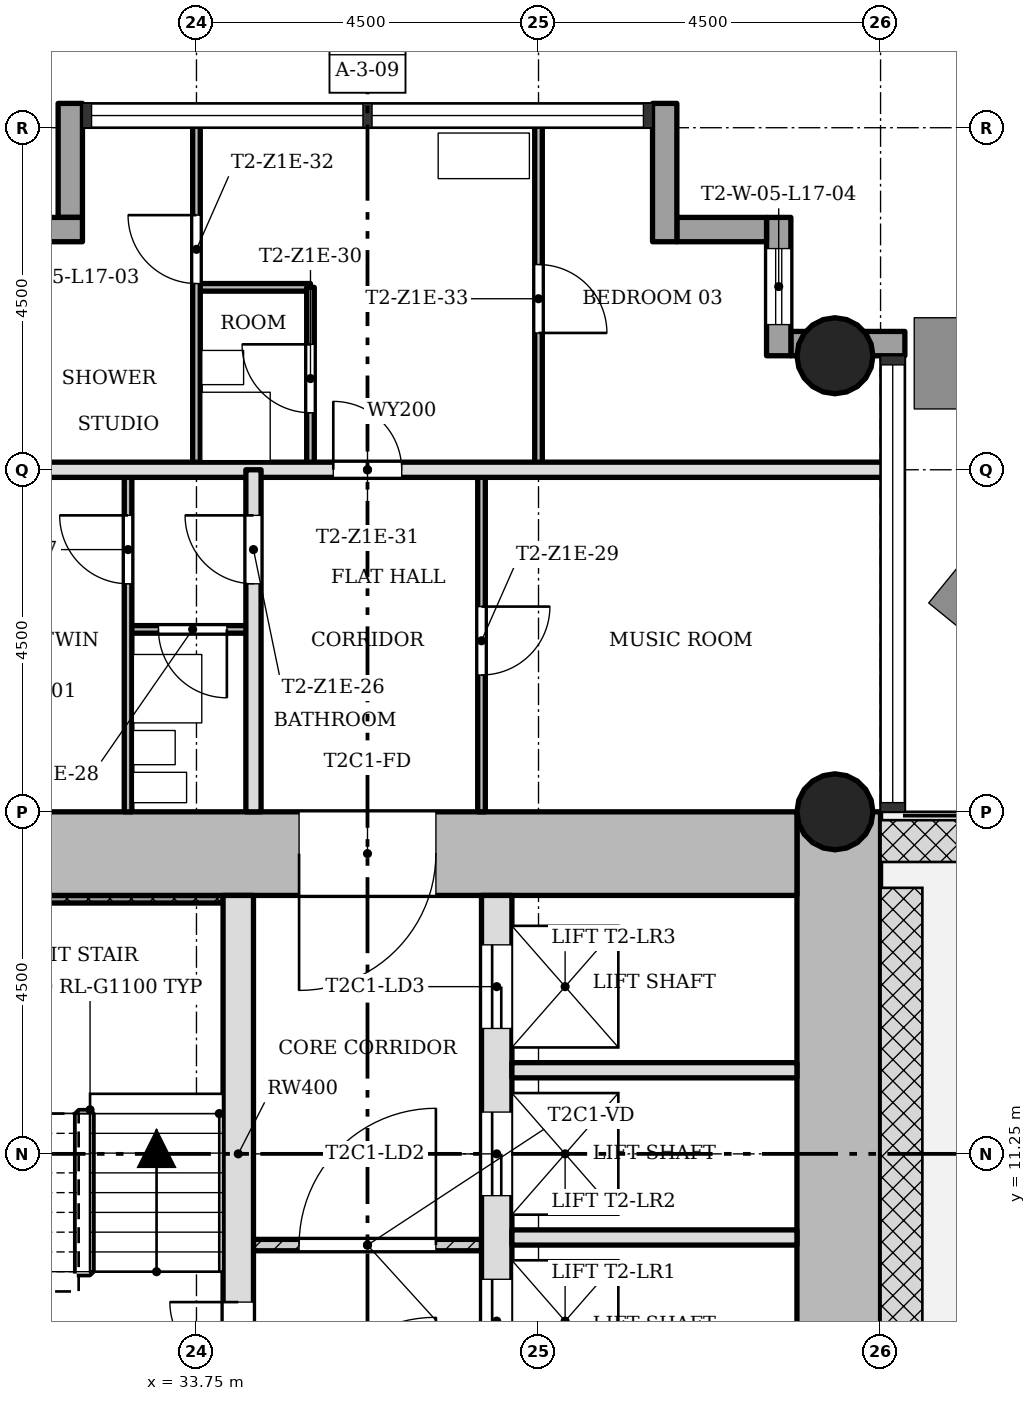
"""IFC4 building model, lengths in metres.
Left out: names, types, materials, properties, quantities, classifications, styles, units other than length and angle.
Written with IfcOpenShell. Run it as: python <this file> out.ifc"""

import sys

from ifc_helpers import new_model, si_unit, direction, frame, frame_2d, origin, origin_2d, place, context, subcontext, project, spatial, rectangle, hollow_circle, extrude, element, fill, save


model = new_model("IFC4")
c1 = context("Model", 3, precision=1e-05, world=origin(), true_north=direction((0.0, 1.0)))
c2 = subcontext(c1, "Body", "Model", "MODEL_VIEW")
j1 = project(units=[si_unit("LENGTHUNIT", "METRE"), si_unit("PLANEANGLEUNIT", "RADIAN")], contexts=[c1])
p1 = place(None, origin())
s1 = spatial("IfcSite", under=j1, at=p1, CompositionType="ELEMENT")
p2 = place(p1, origin())
s2 = spatial("IfcBuilding", under=s1, at=p2, CompositionType="ELEMENT")
p3 = place(p2, frame((0.0, 0.0, 65.3)))
s3 = spatial("IfcBuildingStorey", under=s2, at=p3, CompositionType="ELEMENT", Elevation=65.3)
p4 = place(p3, frame((42.2, 7.85, 0.0), z_axis=(0.0, 0.0, 1.0), x_axis=(0.0, 1.0, 0.0)))
e1 = element("IfcWall", 1, at=p4, inside=s3, PredefinedType="SHEAR", context=c2, shape_type="SweptSolid", body=[
    extrude(rectangle(XDim=7.9, YDim=1.1, at=frame_2d((3.95, 0.0))), origin(), (0.0, 0.0, 1.0), 3.4),
])
p5 = place(p3, frame((41.65, 15.2, 0.0), z_axis=(0.0, 0.0, 1.0), x_axis=(-1.0, 0.0, 0.0)))
e2 = element("IfcWall", 2, at=p5, inside=s3, PredefinedType="SHEAR", context=c2, shape_type="SweptSolid", body=[
    extrude(rectangle(XDim=12.4, YDim=1.1, at=frame_2d((6.2, 0.0))), origin(), (0.0, 0.0, 1.0), 3.4),
])
p6 = place(p5, frame((4.75, 0.0, 0.0)))
e3 = element("IfcOpeningElement", 3, at=p6, cuts=e2, PredefinedType="OPENING", context=c2, shape_type="SweptSolid", body=[
    extrude(rectangle(XDim=1.8, YDim=2.1, at=frame_2d((0.9, 1.05))), frame((0.0, 0.56, 0.0), z_axis=(0.0, -1.0, 0.0), x_axis=(1.0, 0.0, 0.0)), (0.0, 0.0, 1.0), 1.12),
])
p7 = place(p3, frame((34.3, 7.85, 0.0), z_axis=(0.0, 0.0, 1.0), x_axis=(0.0, 1.0, 0.0)))
e4 = element("IfcWall", 4, at=p7, inside=s3, PredefinedType="SHEAR", context=c2, shape_type="SweptSolid", body=[
    extrude(rectangle(XDim=6.8, YDim=0.4, at=frame_2d((3.4, 0.0))), origin(), (0.0, 0.0, 1.0), 3.4),
])
p8 = place(p7, frame((0.55, 0.0, 0.0)))
e5 = element("IfcOpeningElement", 5, at=p8, cuts=e4, PredefinedType="OPENING", context=c2, shape_type="SweptSolid", body=[
    extrude(rectangle(XDim=0.9, YDim=2.1, at=frame_2d((0.45, 1.05))), frame((0.0, 0.21, 0.0), z_axis=(0.0, -1.0, 0.0), x_axis=(1.0, 0.0, 0.0)), (0.0, 0.0, 1.0), 0.42),
])
p9 = place(p3, frame((37.7, 7.85, 0.0), z_axis=(0.0, 0.0, 1.0), x_axis=(0.0, 1.0, 0.0)))
e6 = element("IfcWall", 6, at=p9, inside=s3, PredefinedType="SHEAR", context=c2, shape_type="SweptSolid", body=[
    extrude(rectangle(XDim=6.8, YDim=0.4, at=frame_2d((3.4, 0.0))), origin(), (0.0, 0.0, 1.0), 3.4),
])
p10 = place(p9, frame((0.65, 0.0, 0.0)))
e7 = element("IfcOpeningElement", 7, at=p10, cuts=e6, PredefinedType="OPENING", context=c2, shape_type="SweptSolid", body=[
    extrude(rectangle(XDim=1.1, YDim=2.1, at=frame_2d((0.55, 1.05))), frame((0.0, 0.21, 0.0), z_axis=(0.0, -1.0, 0.0), x_axis=(1.0, 0.0, 0.0)), (0.0, 0.0, 1.0), 0.42),
])
p11 = place(p9, frame((2.85, 0.0, 0.0)))
e8 = element("IfcOpeningElement", 8, at=p11, cuts=e6, PredefinedType="OPENING", context=c2, shape_type="SweptSolid", body=[
    extrude(rectangle(XDim=1.1, YDim=2.1, at=frame_2d((0.55, 1.05))), frame((0.0, 0.21, 0.0), z_axis=(0.0, -1.0, 0.0), x_axis=(1.0, 0.0, 0.0)), (0.0, 0.0, 1.0), 0.42),
])
p12 = place(p9, frame((5.05, 0.0, 0.0)))
e9 = element("IfcOpeningElement", 9, at=p12, cuts=e6, PredefinedType="OPENING", context=c2, shape_type="SweptSolid", body=[
    extrude(rectangle(XDim=1.1, YDim=2.1, at=frame_2d((0.55, 1.05))), frame((0.0, 0.21, 0.0), z_axis=(0.0, -1.0, 0.0), x_axis=(1.0, 0.0, 0.0)), (0.0, 0.0, 1.0), 0.42),
])
for number, where, z_axis, x_axis in (
    (10, (42.15, 15.75, 0.0), (0.0, 0.0, 1.0), (1.0, 0.0, 0.0)),
    (11, (42.15, 21.75, 0.0), (0.0, 0.0, 1.0), (1.0, 0.0, 0.0)),
):
    element("IfcColumn", number, at=place(p3, frame(where, z_axis=z_axis, x_axis=x_axis)), inside=s3, PredefinedType="COLUMN", context=c2, shape_type="SweptSolid", body=[
        extrude(hollow_circle(Radius=0.5, WallThickness=0.036, at=origin_2d()), origin(), (0.0, 0.0, 1.0), 3.4),
    ])
p13 = place(p3, frame((43.07, 21.91, -0.3), z_axis=(0.0, 0.0, 1.0), x_axis=(-1.0, 0.0, 0.0)))
e12 = element("IfcWall", 12, at=p13, inside=s3, PredefinedType="STANDARD", context=c2, shape_type="SweptSolid", body=[
    extrude(rectangle(XDim=1.5, YDim=0.32, at=frame_2d((0.75, 0.0))), origin(), (0.0, 0.0, 1.0), 3.4),
])
p14 = place(p3, frame((41.41, 21.75, -0.3), z_axis=(0.0, 0.0, 1.0), x_axis=(0.0, 1.0, 0.0)))
e13 = element("IfcWall", 13, at=p14, inside=s3, PredefinedType="STANDARD", context=c2, shape_type="SweptSolid", body=[
    extrude(rectangle(XDim=1.82, YDim=0.32, at=frame_2d((0.91, 0.0))), origin(), (0.0, 0.0, 1.0), 3.4),
])
p15 = place(p14, frame((0.41, 0.0, 1.2)))
e14 = element("IfcOpeningElement", 14, at=p15, cuts=e13, PredefinedType="OPENING", context=c2, shape_type="SweptSolid", body=[
    extrude(rectangle(XDim=1.0, YDim=1.5, at=frame_2d((0.5, 0.75))), frame((0.0, 0.17, 0.0), z_axis=(0.0, -1.0, 0.0), x_axis=(1.0, 0.0, 0.0)), (0.0, 0.0, 1.0), 0.34),
])
p16 = place(p3, frame((41.25, 23.41, -0.3), z_axis=(0.0, 0.0, 1.0), x_axis=(-1.0, 0.0, 0.0)))
e15 = element("IfcWall", 15, at=p16, inside=s3, PredefinedType="STANDARD", context=c2, shape_type="SweptSolid", body=[
    extrude(rectangle(XDim=1.18, YDim=0.32, at=frame_2d((0.59, 0.0))), origin(), (0.0, 0.0, 1.0), 3.4),
])
p17 = place(p3, frame((39.91, 23.25, -0.3), z_axis=(0.0, 0.0, 1.0), x_axis=(0.0, 1.0, 0.0)))
e16 = element("IfcWall", 16, at=p17, inside=s3, PredefinedType="STANDARD", context=c2, shape_type="SweptSolid", body=[
    extrude(rectangle(XDim=1.82, YDim=0.32, at=frame_2d((0.91, 0.0))), origin(), (0.0, 0.0, 1.0), 3.4),
])
p18 = place(p3, frame((32.09, 25.07, -0.3), z_axis=(0.0, 0.0, 1.0), x_axis=(0.0, -1.0, 0.0)))
e17 = element("IfcWall", 17, at=p18, inside=s3, PredefinedType="STANDARD", context=c2, shape_type="SweptSolid", body=[
    extrude(rectangle(XDim=1.5, YDim=0.32, at=frame_2d((0.75, 0.0))), origin(), (0.0, 0.0, 1.0), 3.4),
])
p19 = place(p3, frame((32.25, 23.41, -0.3), z_axis=(0.0, 0.0, 1.0), x_axis=(-1.0, 0.0, 0.0)))
e18 = element("IfcWall", 18, at=p19, inside=s3, PredefinedType="STANDARD", context=c2, shape_type="SweptSolid", body=[
    extrude(rectangle(XDim=1.82, YDim=0.32, at=frame_2d((0.91, 0.0))), origin(), (0.0, 0.0, 1.0), 3.4),
])
p20 = place(p19, frame((0.41, 0.0, 1.2)))
e19 = element("IfcOpeningElement", 19, at=p20, cuts=e18, PredefinedType="OPENING", context=c2, shape_type="SweptSolid", body=[
    extrude(rectangle(XDim=1.0, YDim=1.5, at=frame_2d((0.5, 0.75))), frame((0.0, 0.17, 0.0), z_axis=(0.0, -1.0, 0.0), x_axis=(1.0, 0.0, 0.0)), (0.0, 0.0, 1.0), 0.34),
])
p21 = place(p3, frame((37.5, 10.05, 0.0), z_axis=(0.0, 0.0, 1.0), x_axis=(-1.0, 0.0, 0.0)))
e20 = element("IfcWall", 20, at=p21, inside=s3, PredefinedType="PARTITIONING", context=c2, shape_type="SweptSolid", body=[
    extrude(rectangle(XDim=3.0, YDim=0.15, at=frame_2d((1.5, 0.0))), origin(), (0.0, 0.0, 1.0), 3.0),
])
p22 = place(p21, frame((0.6, 0.0, 0.0)))
e21 = element("IfcOpeningElement", 21, at=p22, cuts=e20, PredefinedType="OPENING", context=c2, shape_type="SweptSolid", body=[
    extrude(rectangle(XDim=1.8, YDim=2.1, at=frame_2d((0.9, 1.05))), frame((0.0, 0.085, 0.0), z_axis=(0.0, -1.0, 0.0), x_axis=(1.0, 0.0, 0.0)), (0.0, 0.0, 1.0), 0.17),
])
for number, where, z_axis, x_axis in (
    (22, (41.65, 10.15, 0.0), (0.0, 0.0, 1.0), (-1.0, 0.0, 0.0)),
    (23, (41.65, 12.35, 0.0), (0.0, 0.0, 1.0), (-1.0, 0.0, 0.0)),
):
    element("IfcWall", number, at=place(p3, frame(where, z_axis=z_axis, x_axis=x_axis)), inside=s3, PredefinedType="SOLIDWALL", context=c2, shape_type="SweptSolid", body=[
        extrude(rectangle(XDim=3.75, YDim=0.2, at=frame_2d((1.875, 0.0))), origin(), (0.0, 0.0, 1.0), 3.0),
    ])
p23 = place(p3, frame((34.5, 18.15, 0.0), z_axis=(0.0, 0.0, 1.0), x_axis=(-1.0, 0.0, 0.0)))
e24 = element("IfcWall", 24, at=p23, inside=s3, PredefinedType="PARTITIONING", context=c2, shape_type="SweptSolid", body=[
    extrude(rectangle(XDim=1.65, YDim=0.1, at=frame_2d((0.825, 0.0))), origin(), (0.0, 0.0, 1.0), 3.0),
])
p24 = place(p23, frame((0.35, 0.0, 0.0)))
e25 = element("IfcOpeningElement", 25, at=p24, cuts=e24, PredefinedType="OPENING", context=c2, shape_type="SweptSolid", body=[
    extrude(rectangle(XDim=0.9, YDim=2.1, at=frame_2d((0.45, 1.05))), frame((0.0, 0.06, 0.0), z_axis=(0.0, -1.0, 0.0), x_axis=(1.0, 0.0, 0.0)), (0.0, 0.0, 1.0), 0.12),
])
p25 = place(p3, frame((42.85, 20.25, 0.0), z_axis=(0.0, 0.0, 1.0), x_axis=(-1.0, 0.0, 0.0)))
e26 = element("IfcWall", 26, at=p25, inside=s3, PredefinedType="SOLIDWALL", context=c2, shape_type="SweptSolid", body=[
    extrude(rectangle(XDim=13.7, YDim=0.2, at=frame_2d((6.85, 0.0))), origin(), (0.0, 0.0, 1.0), 3.0),
])
p26 = place(p25, frame((6.4, 0.0, 0.0)))
e27 = element("IfcOpeningElement", 27, at=p26, cuts=e26, PredefinedType="OPENING", context=c2, shape_type="SweptSolid", body=[
    extrude(rectangle(XDim=0.9, YDim=2.1, at=frame_2d((0.45, 1.05))), frame((0.0, 0.11, 0.0), z_axis=(0.0, -1.0, 0.0), x_axis=(1.0, 0.0, 0.0)), (0.0, 0.0, 1.0), 0.22),
])
p27 = place(p3, frame((35.25, 22.65, 0.0), z_axis=(0.0, 0.0, 1.0), x_axis=(-1.0, 0.0, 0.0)))
e28 = element("IfcWall", 28, at=p27, inside=s3, PredefinedType="PARTITIONING", context=c2, shape_type="SweptSolid", body=[
    extrude(rectangle(XDim=1.5, YDim=0.1, at=frame_2d((0.75, 0.0))), origin(), (0.0, 0.0, 1.0), 3.0),
])
p28 = place(p3, frame((38.25, 20.25, 0.0), z_axis=(0.0, 0.0, 1.0), x_axis=(0.0, 1.0, 0.0)))
e29 = element("IfcWall", 29, at=p28, inside=s3, PredefinedType="PARTITIONING", context=c2, shape_type="SweptSolid", body=[
    extrude(rectangle(XDim=4.6, YDim=0.1, at=frame_2d((2.3, 0.0))), origin(), (0.0, 0.0, 1.0), 3.0),
])
p29 = place(p28, frame((1.8, 0.0, 0.0)))
e30 = element("IfcOpeningElement", 30, at=p29, cuts=e29, PredefinedType="OPENING", context=c2, shape_type="SweptSolid", body=[
    extrude(rectangle(XDim=0.9, YDim=2.1, at=frame_2d((0.45, 1.05))), frame((0.0, 0.06, 0.0), z_axis=(0.0, -1.0, 0.0), x_axis=(1.0, 0.0, 0.0)), (0.0, 0.0, 1.0), 0.12),
])
p30 = place(p3, frame((37.5, 15.75, 0.0), z_axis=(0.0, 0.0, 1.0), x_axis=(0.0, 1.0, 0.0)))
e31 = element("IfcWall", 31, at=p30, inside=s3, PredefinedType="PARTITIONING", context=c2, shape_type="SweptSolid", body=[
    extrude(rectangle(XDim=4.5, YDim=0.1, at=frame_2d((2.25, 0.0))), origin(), (0.0, 0.0, 1.0), 3.0),
])
p31 = place(p30, frame((1.8, 0.0, 0.0)))
e32 = element("IfcOpeningElement", 32, at=p31, cuts=e31, PredefinedType="OPENING", context=c2, shape_type="SweptSolid", body=[
    extrude(rectangle(XDim=0.9, YDim=2.1, at=frame_2d((0.45, 1.05))), frame((0.0, 0.06, 0.0), z_axis=(0.0, -1.0, 0.0), x_axis=(1.0, 0.0, 0.0)), (0.0, 0.0, 1.0), 0.12),
])
p32 = place(p3, frame((35.25, 20.25, 0.0), z_axis=(0.0, 0.0, 1.0), x_axis=(0.0, 1.0, 0.0)))
e33 = element("IfcWall", 33, at=p32, inside=s3, PredefinedType="PARTITIONING", context=c2, shape_type="SweptSolid", body=[
    extrude(rectangle(XDim=2.4, YDim=0.1, at=frame_2d((1.2, 0.0))), origin(), (0.0, 0.0, 1.0), 3.0),
])
p33 = place(p32, frame((0.75, 0.0, 0.0)))
e34 = element("IfcOpeningElement", 34, at=p33, cuts=e33, PredefinedType="OPENING", context=c2, shape_type="SweptSolid", body=[
    extrude(rectangle(XDim=0.9, YDim=2.1, at=frame_2d((0.45, 1.05))), frame((0.0, 0.06, 0.0), z_axis=(0.0, -1.0, 0.0), x_axis=(1.0, 0.0, 0.0)), (0.0, 0.0, 1.0), 0.12),
])
p34 = place(p3, frame((34.5, 15.75, 0.0), z_axis=(0.0, 0.0, 1.0), x_axis=(0.0, 1.0, 0.0)))
e35 = element("IfcWall", 35, at=p34, inside=s3, PredefinedType="SOLIDWALL", context=c2, shape_type="SweptSolid", body=[
    extrude(rectangle(XDim=4.5, YDim=0.2, at=frame_2d((2.25, 0.0))), origin(), (0.0, 0.0, 1.0), 3.0),
])
p35 = place(p34, frame((3.0, 0.0, 0.0)))
e36 = element("IfcOpeningElement", 36, at=p35, cuts=e35, PredefinedType="OPENING", context=c2, shape_type="SweptSolid", body=[
    extrude(rectangle(XDim=0.9, YDim=2.1, at=frame_2d((0.45, 1.05))), frame((0.0, 0.11, 0.0), z_axis=(0.0, -1.0, 0.0), x_axis=(1.0, 0.0, 0.0)), (0.0, 0.0, 1.0), 0.22),
])
p36 = place(p3, frame((33.75, 20.25, 0.0), z_axis=(0.0, 0.0, 1.0), x_axis=(0.0, 1.0, 0.0)))
e37 = element("IfcWall", 37, at=p36, inside=s3, PredefinedType="PARTITIONING", context=c2, shape_type="SweptSolid", body=[
    extrude(rectangle(XDim=4.6, YDim=0.1, at=frame_2d((2.3, 0.0))), origin(), (0.0, 0.0, 1.0), 3.0),
])
p37 = place(p36, frame((2.45, 0.0, 0.0)))
e38 = element("IfcOpeningElement", 38, at=p37, cuts=e37, PredefinedType="OPENING", context=c2, shape_type="SweptSolid", body=[
    extrude(rectangle(XDim=0.9, YDim=2.1, at=frame_2d((0.45, 1.05))), frame((0.0, 0.06, 0.0), z_axis=(0.0, -1.0, 0.0), x_axis=(1.0, 0.0, 0.0)), (0.0, 0.0, 1.0), 0.12),
])
p38 = place(p3, frame((32.85, 15.75, 0.0), z_axis=(0.0, 0.0, 1.0), x_axis=(0.0, 1.0, 0.0)))
e39 = element("IfcWall", 39, at=p38, inside=s3, PredefinedType="PARTITIONING", context=c2, shape_type="SweptSolid", body=[
    extrude(rectangle(XDim=4.5, YDim=0.1, at=frame_2d((2.25, 0.0))), origin(), (0.0, 0.0, 1.0), 3.0),
])
p39 = place(p38, frame((3.0, 0.0, 0.0)))
e40 = element("IfcOpeningElement", 40, at=p39, cuts=e39, PredefinedType="OPENING", context=c2, shape_type="SweptSolid", body=[
    extrude(rectangle(XDim=0.9, YDim=2.1, at=frame_2d((0.45, 1.05))), frame((0.0, 0.06, 0.0), z_axis=(0.0, -1.0, 0.0), x_axis=(1.0, 0.0, 0.0)), (0.0, 0.0, 1.0), 0.12),
])
p40 = place(p3, frame((34.1, 14.6, 0.0), z_axis=(0.0, 0.0, 1.0), x_axis=(-1.0, 0.0, 0.0)))
e41 = element("IfcWall", 41, at=p40, inside=s3, PredefinedType="SHEAR", context=c2, shape_type="SweptSolid", body=[
    extrude(rectangle(XDim=3.75, YDim=0.1, at=frame_2d((1.875, 0.0))), origin(), (0.0, 0.0, 1.0), 3.4),
])
p41 = place(p22, origin())
e42 = element("IfcDoor", 42, at=p41, inside=s3, OperationType="SINGLE_SWING_LEFT", PredefinedType="DOOR", context=c2, shape_type="SweptSolid", body=[
    extrude(rectangle(XDim=1.8, YDim=2.1, at=frame_2d((0.9, 1.05))), frame((0.0, 0.025, 0.0), z_axis=(0.0, -1.0, 0.0), x_axis=(1.0, 0.0, 0.0)), (0.0, 0.0, 1.0), 0.05),
])
fill(e21, e42)
p42 = place(p35, origin())
e43 = element("IfcDoor", 43, at=p42, inside=s3, OperationType="SINGLE_SWING_LEFT", PredefinedType="DOOR", context=c2, shape_type="SweptSolid", body=[
    extrude(rectangle(XDim=0.9, YDim=2.1, at=frame_2d((0.45, 1.05))), frame((0.0, 0.025, 0.0), z_axis=(0.0, -1.0, 0.0), x_axis=(1.0, 0.0, 0.0)), (0.0, 0.0, 1.0), 0.05),
])
fill(e36, e43)
p43 = place(p39, origin())
e44 = element("IfcDoor", 44, at=p43, inside=s3, OperationType="SINGLE_SWING_LEFT", PredefinedType="DOOR", context=c2, shape_type="SweptSolid", body=[
    extrude(rectangle(XDim=0.9, YDim=2.1, at=frame_2d((0.45, 1.05))), frame((0.0, 0.025, 0.0), z_axis=(0.0, -1.0, 0.0), x_axis=(1.0, 0.0, 0.0)), (0.0, 0.0, 1.0), 0.05),
])
fill(e40, e44)
p44 = place(p24, origin())
e45 = element("IfcDoor", 45, at=p44, inside=s3, OperationType="SINGLE_SWING_RIGHT", PredefinedType="DOOR", context=c2, shape_type="SweptSolid", body=[
    extrude(rectangle(XDim=0.9, YDim=2.1, at=frame_2d((0.45, 1.05))), frame((0.0, 0.025, 0.0), z_axis=(0.0, -1.0, 0.0), x_axis=(1.0, 0.0, 0.0)), (0.0, 0.0, 1.0), 0.05),
])
fill(e25, e45)
p45 = place(p31, origin())
e46 = element("IfcDoor", 46, at=p45, inside=s3, OperationType="SINGLE_SWING_RIGHT", PredefinedType="DOOR", context=c2, shape_type="SweptSolid", body=[
    extrude(rectangle(XDim=0.9, YDim=2.1, at=frame_2d((0.45, 1.05))), frame((0.0, 0.025, 0.0), z_axis=(0.0, -1.0, 0.0), x_axis=(1.0, 0.0, 0.0)), (0.0, 0.0, 1.0), 0.05),
])
fill(e32, e46)
p46 = place(p33, origin())
e47 = element("IfcDoor", 47, at=p46, inside=s3, OperationType="SINGLE_SWING_LEFT", PredefinedType="DOOR", context=c2, shape_type="SweptSolid", body=[
    extrude(rectangle(XDim=0.9, YDim=2.1, at=frame_2d((0.45, 1.05))), frame((0.0, 0.025, 0.0), z_axis=(0.0, -1.0, 0.0), x_axis=(1.0, 0.0, 0.0)), (0.0, 0.0, 1.0), 0.05),
])
fill(e34, e47)
p47 = place(p26, origin())
e48 = element("IfcDoor", 48, at=p47, inside=s3, OperationType="SINGLE_SWING_RIGHT", PredefinedType="DOOR", context=c2, shape_type="SweptSolid", body=[
    extrude(rectangle(XDim=0.9, YDim=2.1, at=frame_2d((0.45, 1.05))), frame((0.0, 0.025, 0.0), z_axis=(0.0, -1.0, 0.0), x_axis=(1.0, 0.0, 0.0)), (0.0, 0.0, 1.0), 0.05),
])
fill(e27, e48)
p48 = place(p37, origin())
e49 = element("IfcDoor", 49, at=p48, inside=s3, OperationType="SINGLE_SWING_LEFT", PredefinedType="DOOR", context=c2, shape_type="SweptSolid", body=[
    extrude(rectangle(XDim=0.9, YDim=2.1, at=frame_2d((0.45, 1.05))), frame((0.0, 0.025, 0.0), z_axis=(0.0, -1.0, 0.0), x_axis=(1.0, 0.0, 0.0)), (0.0, 0.0, 1.0), 0.05),
])
fill(e38, e49)
p49 = place(p29, origin())
e50 = element("IfcDoor", 50, at=p49, inside=s3, OperationType="SINGLE_SWING_LEFT", PredefinedType="DOOR", context=c2, shape_type="SweptSolid", body=[
    extrude(rectangle(XDim=0.9, YDim=2.1, at=frame_2d((0.45, 1.05))), frame((0.0, 0.025, 0.0), z_axis=(0.0, -1.0, 0.0), x_axis=(1.0, 0.0, 0.0)), (0.0, 0.0, 1.0), 0.05),
])
fill(e30, e50)
p50 = place(p8, origin())
e51 = element("IfcDoor", 51, at=p50, inside=s3, OperationType="SINGLE_SWING_LEFT", PredefinedType="DOOR", context=c2, shape_type="SweptSolid", body=[
    extrude(rectangle(XDim=0.9, YDim=2.1, at=frame_2d((0.45, 1.05))), frame((0.0, 0.025, 0.0), z_axis=(0.0, -1.0, 0.0), x_axis=(1.0, 0.0, 0.0)), (0.0, 0.0, 1.0), 0.05),
])
fill(e5, e51)
p51 = place(p10, origin())
e52 = element("IfcDoor", 52, at=p51, inside=s3, OperationType="SLIDING_TO_LEFT", PredefinedType="DOOR", context=c2, shape_type="SweptSolid", body=[
    extrude(rectangle(XDim=1.1, YDim=2.1, at=frame_2d((0.55, 1.05))), frame((0.0, 0.025, 0.0), z_axis=(0.0, -1.0, 0.0), x_axis=(1.0, 0.0, 0.0)), (0.0, 0.0, 1.0), 0.05),
])
fill(e7, e52)
p52 = place(p11, origin())
e53 = element("IfcDoor", 53, at=p52, inside=s3, OperationType="SLIDING_TO_LEFT", PredefinedType="DOOR", context=c2, shape_type="SweptSolid", body=[
    extrude(rectangle(XDim=1.1, YDim=2.1, at=frame_2d((0.55, 1.05))), frame((0.0, 0.025, 0.0), z_axis=(0.0, -1.0, 0.0), x_axis=(1.0, 0.0, 0.0)), (0.0, 0.0, 1.0), 0.05),
])
fill(e8, e53)
p53 = place(p12, origin())
e54 = element("IfcDoor", 54, at=p53, inside=s3, OperationType="SLIDING_TO_LEFT", PredefinedType="DOOR", context=c2, shape_type="SweptSolid", body=[
    extrude(rectangle(XDim=1.1, YDim=2.1, at=frame_2d((0.55, 1.05))), frame((0.0, 0.025, 0.0), z_axis=(0.0, -1.0, 0.0), x_axis=(1.0, 0.0, 0.0)), (0.0, 0.0, 1.0), 0.05),
])
fill(e9, e54)
p54 = place(p6, origin())
e55 = element("IfcDoor", 55, at=p54, inside=s3, OperationType="SINGLE_SWING_LEFT", PredefinedType="DOOR", context=c2, shape_type="SweptSolid", body=[
    extrude(rectangle(XDim=1.8, YDim=2.1, at=frame_2d((0.9, 1.05))), frame((0.0, 0.025, 0.0), z_axis=(0.0, -1.0, 0.0), x_axis=(1.0, 0.0, 0.0)), (0.0, 0.0, 1.0), 0.05),
])
fill(e3, e55)
p55 = place(p15, origin())
e56 = element("IfcWindow", 56, at=p55, inside=s3, PartitioningType="SINGLE_PANEL", PredefinedType="WINDOW", context=c2, shape_type="SweptSolid", body=[
    extrude(rectangle(XDim=1.0, YDim=1.5, at=frame_2d((0.5, 0.75))), frame((0.0, 0.03, 0.0), z_axis=(0.0, -1.0, 0.0), x_axis=(1.0, 0.0, 0.0)), (0.0, 0.0, 1.0), 0.06),
])
fill(e14, e56)
save(model, sys.argv[1])
